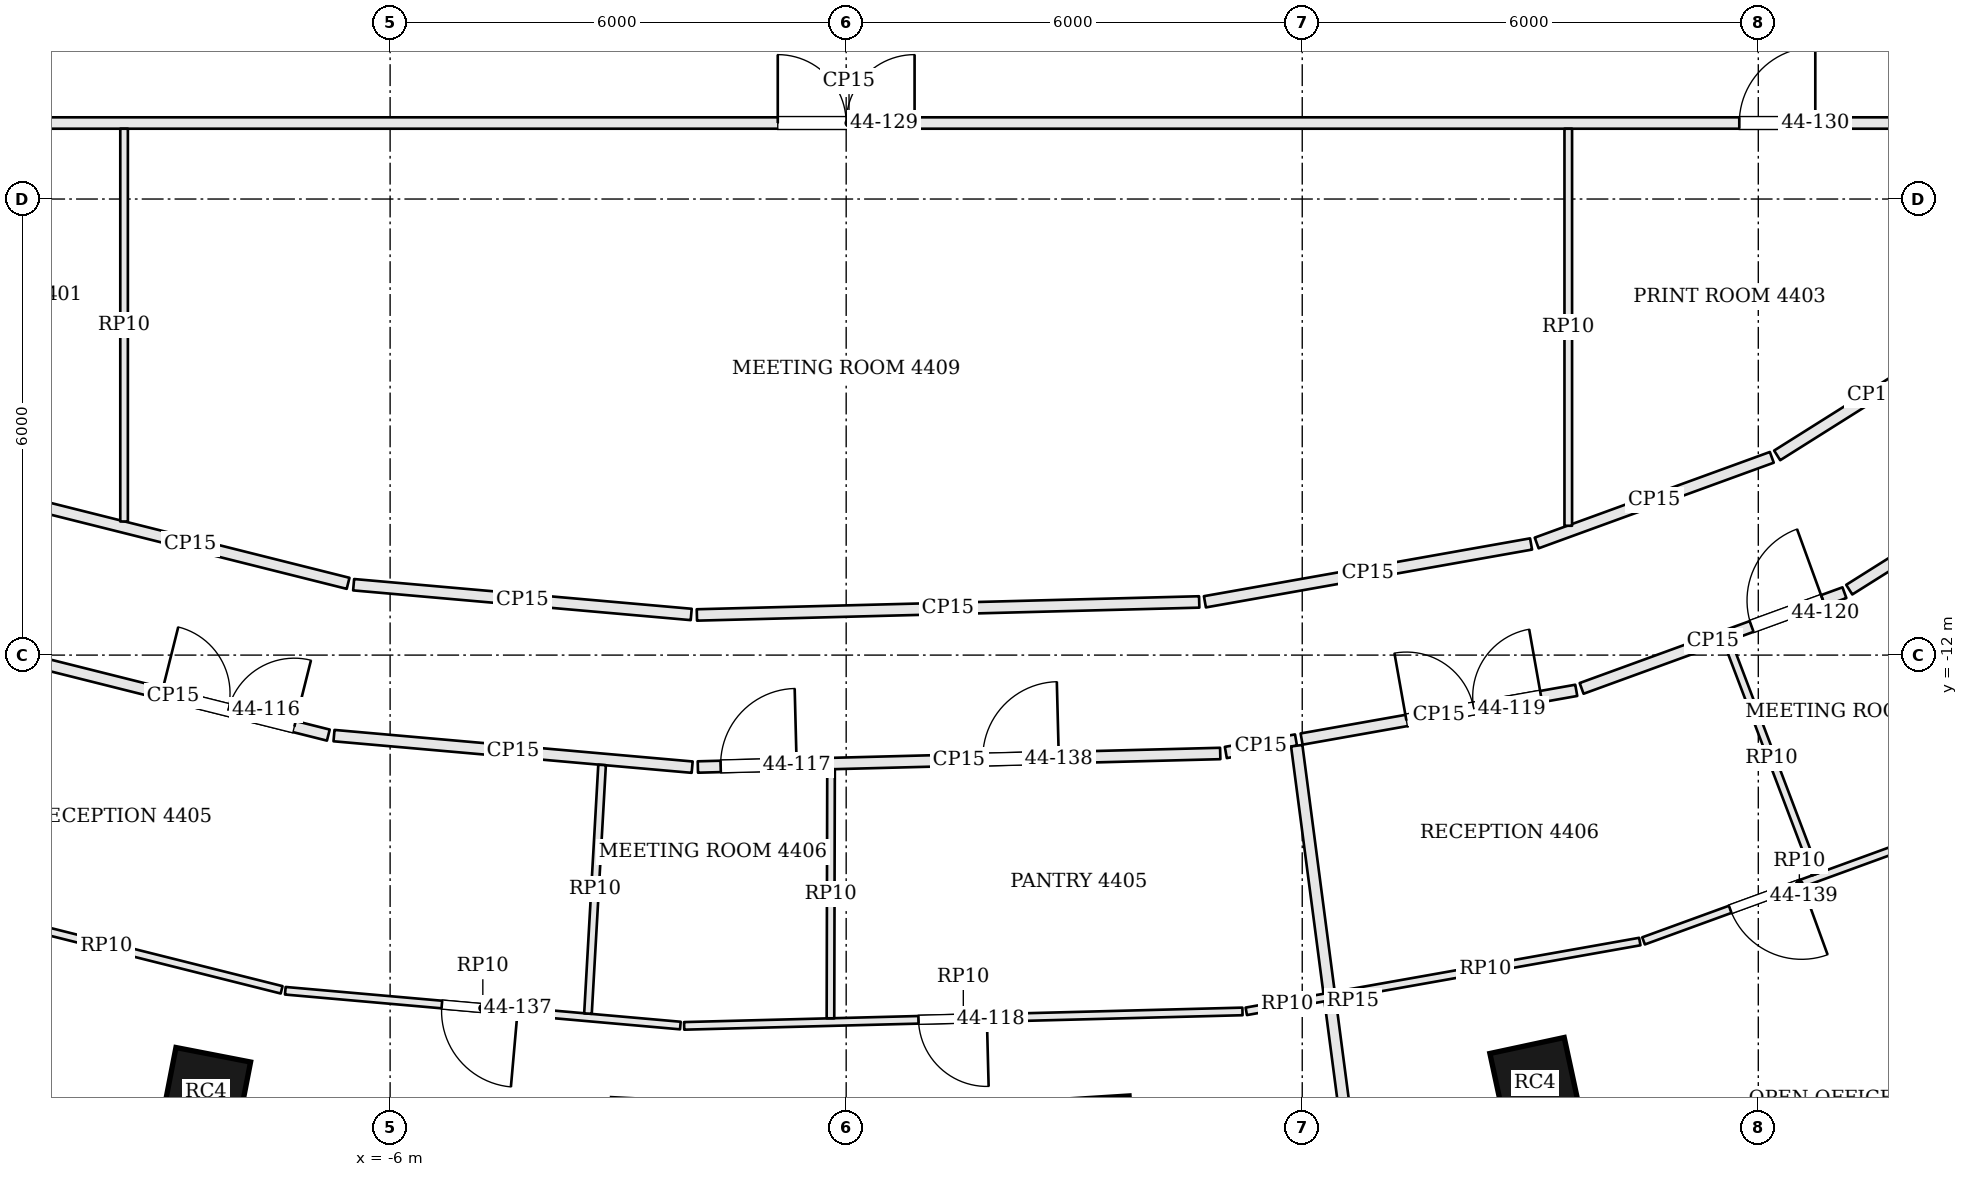
"""IFC4 building model, lengths in metres.
Left out: names, types, materials, properties, quantities, classifications, styles, units other than length and angle.
Written with IfcOpenShell. Run it as: python <this file> out.ifc"""

import sys

from ifc_helpers import new_model, si_unit, direction, frame, frame_2d, origin, origin_2d, place, context, subcontext, project, spatial, rectangle, extrude, element, fill, save


model = new_model("IFC4")
c1 = context("Model", 3, precision=1e-05, world=origin(), true_north=direction((0.0, 1.0)))
c2 = subcontext(c1, "Body", "Model", "MODEL_VIEW")
j1 = project(units=[si_unit("LENGTHUNIT", "METRE"), si_unit("PLANEANGLEUNIT", "RADIAN")], contexts=[c1])
p1 = place(None, origin())
s1 = spatial("IfcSite", under=j1, at=p1, CompositionType="ELEMENT")
p2 = place(p1, origin())
s2 = spatial("IfcBuilding", under=s1, at=p2, CompositionType="ELEMENT")
p3 = place(p2, frame((0.0, 0.0, 181.8)))
s3 = spatial("IfcBuildingStorey", under=s2, at=p3, CompositionType="ELEMENT", Elevation=181.8)
for number, where, z_axis, x_axis in (
    (1, (-8.422, -17.749, 0.0), (0.0, 0.0, 1.0), (0.982, -0.191, 0.0)),
    (2, (3.254, -18.33, 0.0), (0.0, 0.0, 1.0), (0.998, 0.063, 0.0)),
    (3, (9.063, -17.625, 0.0), (0.0, 0.0, 1.0), (0.978, 0.21, 0.0)),
):
    element("IfcColumn", number, at=place(p3, frame(where, z_axis=z_axis, x_axis=x_axis)), inside=s3, PredefinedType="COLUMN", context=c2, shape_type="SweptSolid", body=[
        extrude(rectangle(XDim=1.0, YDim=1.0, at=origin_2d()), origin(), (0.0, 0.0, 1.0), 3.9),
    ])
p4 = place(p3, frame((-10.897, -12.029, 0.0), z_axis=(0.0, 0.0, 1.0), x_axis=(0.969999087169, -0.24310855783, 0.0)))
e4 = element("IfcWall", 4, at=p4, inside=s3, PredefinedType="PARTITIONING", context=c2, shape_type="SweptSolid", body=[
    extrude(rectangle(XDim=4.211, YDim=0.15, at=frame_2d((2.105, 0.0))), origin(), (0.0, 0.0, 1.0), 3.084),
])
p5 = place(p4, frame((1.95, 0.0, 0.0)))
e5 = element("IfcOpeningElement", 5, at=p5, cuts=e4, PredefinedType="OPENING", context=c2, shape_type="SweptSolid", body=[
    extrude(rectangle(XDim=1.8, YDim=2.1, at=frame_2d((0.9, 1.05))), frame((0.0, 0.085, 0.0), z_axis=(0.0, -1.0, 0.0), x_axis=(1.0, 0.0, 0.0)), (0.0, 0.0, 1.0), 0.17),
])
p6 = place(p3, frame((-6.738, -13.059, 0.0), z_axis=(0.0, 0.0, 1.0), x_axis=(0.996143527037, -0.087738666181, 0.0)))
e6 = element("IfcWall", 6, at=p6, inside=s3, PredefinedType="PARTITIONING", context=c2, shape_type="SweptSolid", body=[
    extrude(rectangle(XDim=4.73, YDim=0.15, at=frame_2d((2.365, 0.0))), origin(), (0.0, 0.0, 1.0), 3.084),
])
p7 = place(p3, frame((-1.951, -13.472, 0.0), z_axis=(0.0, 0.0, 1.0), x_axis=(0.999663898238, 0.025924709429, 0.0)))
e7 = element("IfcWall", 7, at=p7, inside=s3, PredefinedType="PARTITIONING", context=c2, shape_type="SweptSolid", body=[
    extrude(rectangle(XDim=6.875, YDim=0.15, at=frame_2d((3.437, 0.0))), origin(), (0.0, 0.0, 1.0), 3.084),
])
p8 = place(p7, frame((0.3, 0.0, 0.0)))
e8 = element("IfcOpeningElement", 8, at=p8, cuts=e7, PredefinedType="OPENING", context=c2, shape_type="SweptSolid", body=[
    extrude(rectangle(XDim=1.0, YDim=2.4, at=frame_2d((0.5, 1.2))), frame((0.0, 0.085, 0.0), z_axis=(0.0, -1.0, 0.0), x_axis=(1.0, 0.0, 0.0)), (0.0, 0.0, 1.0), 0.17),
])
p9 = place(p7, frame((3.75, 0.0, 0.0)))
e9 = element("IfcOpeningElement", 9, at=p9, cuts=e7, PredefinedType="OPENING", context=c2, shape_type="SweptSolid", body=[
    extrude(rectangle(XDim=1.0, YDim=2.1, at=frame_2d((0.5, 1.05))), frame((0.0, 0.085, 0.0), z_axis=(0.0, -1.0, 0.0), x_axis=(1.0, 0.0, 0.0)), (0.0, 0.0, 1.0), 0.17),
])
p10 = place(p3, frame((4.995, -13.281, 0.0), z_axis=(0.0, 0.0, 1.0), x_axis=(0.984615318048, 0.174736016506, 0.0)))
e10 = element("IfcWall", 10, at=p10, inside=s3, PredefinedType="PARTITIONING", context=c2, shape_type="SweptSolid", body=[
    extrude(rectangle(XDim=0.938, YDim=0.15, at=frame_2d((0.469, 0.0))), origin(), (0.0, 0.0, 1.0), 3.084),
])
p11 = place(p3, frame((6.807, -19.901, 0.0), z_axis=(0.0, 0.0, 1.0), x_axis=(-0.129934596003, 0.991522566945, 0.0)))
e11 = element("IfcWall", 11, at=p11, inside=s3, PredefinedType="PARTITIONING", context=c2, shape_type="SweptSolid", body=[
    extrude(rectangle(XDim=6.766, YDim=0.15, at=frame_2d((3.383, 0.0))), origin(), (0.0, 0.0, 1.0), 3.234),
])
p12 = place(p3, frame((5.992, -13.104, 0.0), z_axis=(0.0, 0.0, 1.0), x_axis=(0.98463249319, 0.174639209096, 0.0)))
e12 = element("IfcWall", 12, at=p12, inside=s3, PredefinedType="PARTITIONING", context=c2, shape_type="SweptSolid", body=[
    extrude(rectangle(XDim=3.67, YDim=0.15, at=frame_2d((1.835, 0.0))), origin(), (0.0, 0.0, 1.0), 3.084),
])
p13 = place(p12, frame((1.4, 0.0, 0.0)))
e13 = element("IfcOpeningElement", 13, at=p13, cuts=e12, PredefinedType="OPENING", context=c2, shape_type="SweptSolid", body=[
    extrude(rectangle(XDim=1.8, YDim=2.1, at=frame_2d((0.9, 1.05))), frame((0.0, 0.085, 0.0), z_axis=(0.0, -1.0, 0.0), x_axis=(1.0, 0.0, 0.0)), (0.0, 0.0, 1.0), 0.17),
])
p14 = place(p3, frame((9.676, -12.438, 0.0), z_axis=(0.0, 0.0, 1.0), x_axis=(0.939640289748, 0.342163887461, 0.0)))
e14 = element("IfcWall", 14, at=p14, inside=s3, PredefinedType="PARTITIONING", context=c2, shape_type="SweptSolid", body=[
    extrude(rectangle(XDim=3.68, YDim=0.15, at=frame_2d((1.84, 0.0))), origin(), (0.0, 0.0, 1.0), 3.084),
])
p15 = place(p14, frame((2.38, 0.0, 0.0)))
e15 = element("IfcOpeningElement", 15, at=p15, cuts=e14, PredefinedType="OPENING", context=c2, shape_type="SweptSolid", body=[
    extrude(rectangle(XDim=1.0, YDim=2.4, at=frame_2d((0.5, 1.2))), frame((0.0, 0.085, 0.0), z_axis=(0.0, -1.0, 0.0), x_axis=(1.0, 0.0, 0.0)), (0.0, 0.0, 1.0), 0.17),
])
p16 = place(p3, frame((13.197, -11.139, 0.0), z_axis=(0.0, 0.0, 1.0), x_axis=(0.846390903833, 0.532562144644, 0.0)))
e16 = element("IfcWall", 16, at=p16, inside=s3, PredefinedType="PARTITIONING", context=c2, shape_type="SweptSolid", body=[
    extrude(rectangle(XDim=3.481, YDim=0.15, at=frame_2d((1.741, 0.0))), origin(), (0.0, 0.0, 1.0), 3.084),
])
p17 = place(p16, frame((1.45, 0.0, 0.0)))
e17 = element("IfcOpeningElement", 17, at=p17, cuts=e16, PredefinedType="OPENING", context=c2, shape_type="SweptSolid", body=[
    extrude(rectangle(XDim=1.0, YDim=2.1, at=frame_2d((0.5, 1.05))), frame((0.0, 0.085, 0.0), z_axis=(0.0, -1.0, 0.0), x_axis=(1.0, 0.0, 0.0)), (0.0, 0.0, 1.0), 0.17),
])
p18 = place(p3, frame((14.777, -7.781, 0.0), z_axis=(0.0, 0.0, 1.0), x_axis=(-0.846359741043, -0.532611667862, 0.0)))
e18 = element("IfcWall", 18, at=p18, inside=s3, PredefinedType="PARTITIONING", context=c2, shape_type="SweptSolid", body=[
    extrude(rectangle(XDim=2.987, YDim=0.15, at=frame_2d((1.494, 0.0))), origin(), (0.0, 0.0, 1.0), 3.084),
])
p19 = place(p3, frame((12.178, -9.398, 0.0), z_axis=(0.0, 0.0, 1.0), x_axis=(-0.939609240084, -0.342249143093, 0.0)))
e19 = element("IfcWall", 19, at=p19, inside=s3, PredefinedType="PARTITIONING", context=c2, shape_type="SweptSolid", body=[
    extrude(rectangle(XDim=3.292, YDim=0.15, at=frame_2d((1.646, 0.0))), origin(), (0.0, 0.0, 1.0), 3.084),
])
p20 = place(p3, frame((9.01, -10.538, 0.0), z_axis=(0.0, 0.0, 1.0), x_axis=(-0.984645638575, -0.174565077936, 0.0)))
e20 = element("IfcWall", 20, at=p20, inside=s3, PredefinedType="PARTITIONING", context=c2, shape_type="SweptSolid", body=[
    extrude(rectangle(XDim=4.358, YDim=0.15, at=frame_2d((2.179, 0.0))), origin(), (0.0, 0.0, 1.0), 3.084),
])
p21 = place(p3, frame((4.645, -11.301, 0.0), z_axis=(0.0, 0.0, 1.0), x_axis=(-0.9996648469, -0.02588810291, 0.0)))
e21 = element("IfcWall", 21, at=p21, inside=s3, PredefinedType="PARTITIONING", context=c2, shape_type="SweptSolid", body=[
    extrude(rectangle(XDim=6.611, YDim=0.15, at=frame_2d((3.305, 0.0))), origin(), (0.0, 0.0, 1.0), 3.084),
])
p22 = place(p3, frame((-2.039, -11.465, 0.0), z_axis=(0.0, 0.0, 1.0), x_axis=(-0.996139855484, 0.087780341286, 0.0)))
e22 = element("IfcWall", 22, at=p22, inside=s3, PredefinedType="PARTITIONING", context=c2, shape_type="SweptSolid", body=[
    extrude(rectangle(XDim=4.458, YDim=0.15, at=frame_2d((2.229, 0.0))), origin(), (0.0, 0.0, 1.0), 3.084),
])
p23 = place(p3, frame((-6.553, -11.056, 0.0), z_axis=(0.0, 0.0, 1.0), x_axis=(-0.970004917182, 0.243085294995, 0.0)))
e23 = element("IfcWall", 23, at=p23, inside=s3, PredefinedType="PARTITIONING", context=c2, shape_type="SweptSolid", body=[
    extrude(rectangle(XDim=4.284, YDim=0.15, at=frame_2d((2.142, 0.0))), origin(), (0.0, 0.0, 1.0), 3.084),
])
p24 = place(p3, frame((-14.925, -5.0, 0.0), z_axis=(0.0, 0.0, 1.0), x_axis=(1.0, 0.0, 0.0)))
e24 = element("IfcWall", 24, at=p24, inside=s3, PredefinedType="PARTITIONING", context=c2, shape_type="SweptSolid", body=[
    extrude(rectangle(XDim=29.925, YDim=0.15, at=frame_2d((14.962, 0.0))), origin(), (0.0, 0.0, 1.0), 3.084),
])
p25 = place(p24, frame((2.175, 0.0, 0.0)))
e25 = element("IfcOpeningElement", 25, at=p25, cuts=e24, PredefinedType="OPENING", context=c2, shape_type="SweptSolid", body=[
    extrude(rectangle(XDim=1.0, YDim=2.1, at=frame_2d((0.5, 1.05))), frame((0.0, 0.085, 0.0), z_axis=(0.0, -1.0, 0.0), x_axis=(1.0, 0.0, 0.0)), (0.0, 0.0, 1.0), 0.17),
])
p26 = place(p24, frame((14.025, 0.0, 0.0)))
e26 = element("IfcOpeningElement", 26, at=p26, cuts=e24, PredefinedType="OPENING", context=c2, shape_type="SweptSolid", body=[
    extrude(rectangle(XDim=1.8, YDim=2.1, at=frame_2d((0.9, 1.05))), frame((0.0, 0.085, 0.0), z_axis=(0.0, -1.0, 0.0), x_axis=(1.0, 0.0, 0.0)), (0.0, 0.0, 1.0), 0.17),
])
p27 = place(p24, frame((26.675, 0.0, 0.0)))
e27 = element("IfcOpeningElement", 27, at=p27, cuts=e24, PredefinedType="OPENING", context=c2, shape_type="SweptSolid", body=[
    extrude(rectangle(XDim=1.0, YDim=2.1, at=frame_2d((0.5, 1.05))), frame((0.0, 0.085, 0.0), z_axis=(0.0, -1.0, 0.0), x_axis=(1.0, 0.0, 0.0)), (0.0, 0.0, 1.0), 0.17),
])
p28 = place(p3, frame((6.34, -16.496, 0.0), z_axis=(0.0, 0.0, 1.0), x_axis=(-0.984632558058, -0.174638843366, 0.0)))
e28 = element("IfcWall", 28, at=p28, inside=s3, PredefinedType="PARTITIONING", context=c2, shape_type="SweptSolid", body=[
    extrude(rectangle(XDim=1.093, YDim=0.1, at=frame_2d((0.547, 0.0))), origin(), (0.0, 0.0, 1.0), 3.084),
])
p29 = place(p3, frame((5.214, -16.688, 0.0), z_axis=(0.0, 0.0, 1.0), x_axis=(-0.999664981446, -0.025882906921, 0.0)))
e29 = element("IfcWall", 29, at=p29, inside=s3, PredefinedType="PARTITIONING", context=c2, shape_type="SweptSolid", body=[
    extrude(rectangle(XDim=7.348, YDim=0.1, at=frame_2d((3.674, 0.0))), origin(), (0.0, 0.0, 1.0), 3.084),
])
p30 = place(p29, frame((3.364, 0.0, 0.0)))
e30 = element("IfcOpeningElement", 30, at=p30, cuts=e29, PredefinedType="OPENING", context=c2, shape_type="SweptSolid", body=[
    extrude(rectangle(XDim=0.9, YDim=2.1, at=frame_2d((0.45, 1.05))), frame((0.0, 0.06, 0.0), z_axis=(0.0, -1.0, 0.0), x_axis=(1.0, 0.0, 0.0)), (0.0, 0.0, 1.0), 0.12),
])
p31 = place(p3, frame((-2.181, -16.874, 0.0), z_axis=(0.0, 0.0, 1.0), x_axis=(-0.996143934904, 0.087734035321, 0.0)))
e31 = element("IfcWall", 31, at=p31, inside=s3, PredefinedType="PARTITIONING", context=c2, shape_type="SweptSolid", body=[
    extrude(rectangle(XDim=5.218, YDim=0.1, at=frame_2d((2.609, 0.0))), origin(), (0.0, 0.0, 1.0), 3.084),
])
p32 = place(p31, frame((2.15, 0.0, 0.0)))
e32 = element("IfcOpeningElement", 32, at=p32, cuts=e31, PredefinedType="OPENING", context=c2, shape_type="SweptSolid", body=[
    extrude(rectangle(XDim=1.0, YDim=2.1, at=frame_2d((0.5, 1.05))), frame((0.0, 0.06, 0.0), z_axis=(0.0, -1.0, 0.0), x_axis=(1.0, 0.0, 0.0)), (0.0, 0.0, 1.0), 0.12),
])
p33 = place(p3, frame((-7.427, -16.404, 0.0), z_axis=(0.0, 0.0, 1.0), x_axis=(-0.970009433409, 0.243067272783, 0.0)))
e33 = element("IfcWall", 33, at=p33, inside=s3, PredefinedType="PARTITIONING", context=c2, shape_type="SweptSolid", body=[
    extrude(rectangle(XDim=4.754, YDim=0.1, at=frame_2d((2.377, 0.0))), origin(), (0.0, 0.0, 1.0), 3.084),
])
p34 = place(p3, frame((-3.211, -13.445, 0.0), z_axis=(0.0, 0.0, 1.0), x_axis=(-0.056703901856, -0.99839103938, 0.0)))
e34 = element("IfcWall", 34, at=p34, inside=s3, PredefinedType="PARTITIONING", context=c2, shape_type="SweptSolid", body=[
    extrude(rectangle(XDim=3.277, YDim=0.1, at=frame_2d((1.638, 0.0))), origin(), (0.0, 0.0, 1.0), 3.084),
])
p35 = place(p3, frame((-0.199, -13.502, 0.0), z_axis=(0.0, 0.0, 1.0), x_axis=(-0.002309978934, -0.999997331995, 0.0)))
e35 = element("IfcWall", 35, at=p35, inside=s3, PredefinedType="PARTITIONING", context=c2, shape_type="SweptSolid", body=[
    extrude(rectangle(XDim=3.276, YDim=0.1, at=frame_2d((1.638, 0.0))), origin(), (0.0, 0.0, 1.0), 3.084),
])
p36 = place(p3, frame((14.59, -14.267, 0.0), z_axis=(0.0, 0.0, 1.0), x_axis=(-0.939623405418, -0.342210251148, 0.0)))
e36 = element("IfcWall", 36, at=p36, inside=s3, PredefinedType="PARTITIONING", context=c2, shape_type="SweptSolid", body=[
    extrude(rectangle(XDim=4.363, YDim=0.1, at=frame_2d((2.182, 0.0))), origin(), (0.0, 0.0, 1.0), 3.084),
])
p37 = place(p36, frame((2.15, 0.0, 0.0)))
e37 = element("IfcOpeningElement", 37, at=p37, cuts=e36, PredefinedType="OPENING", context=c2, shape_type="SweptSolid", body=[
    extrude(rectangle(XDim=1.0, YDim=2.1, at=frame_2d((0.5, 1.05))), frame((0.0, 0.06, 0.0), z_axis=(0.0, -1.0, 0.0), x_axis=(1.0, 0.0, 0.0)), (0.0, 0.0, 1.0), 0.12),
])
p38 = place(p3, frame((10.441, -15.769, 0.0), z_axis=(0.0, 0.0, 1.0), x_axis=(-0.984637220861, -0.174612551941, 0.0)))
e38 = element("IfcWall", 38, at=p38, inside=s3, PredefinedType="PARTITIONING", context=c2, shape_type="SweptSolid", body=[
    extrude(rectangle(XDim=4.125, YDim=0.1, at=frame_2d((2.062, 0.0))), origin(), (0.0, 0.0, 1.0), 3.084),
])
p39 = place(p3, frame((11.594, -11.819, 0.0), z_axis=(0.0, 0.0, 1.0), x_axis=(0.354584575087, -0.935023945742, 0.0)))
e39 = element("IfcWall", 39, at=p39, inside=s3, PredefinedType="PARTITIONING", context=c2, shape_type="SweptSolid", body=[
    extrude(rectangle(XDim=3.275, YDim=0.1, at=frame_2d((1.638, 0.0))), origin(), (0.0, 0.0, 1.0), 3.084),
])
p40 = place(p3, frame((-9.5, -10.242, 0.0), z_axis=(0.0, 0.0, 1.0), x_axis=(0.0, 1.0, 0.0)))
e40 = element("IfcWall", 40, at=p40, inside=s3, PredefinedType="PARTITIONING", context=c2, shape_type="SweptSolid", body=[
    extrude(rectangle(XDim=5.167, YDim=0.1, at=frame_2d((2.583, 0.0))), origin(), (0.0, 0.0, 1.0), 3.084),
])
p41 = place(p3, frame((9.5, -10.299, 0.0), z_axis=(0.0, 0.0, 1.0), x_axis=(0.0, 1.0, 0.0)))
e41 = element("IfcWall", 41, at=p41, inside=s3, PredefinedType="PARTITIONING", context=c2, shape_type="SweptSolid", body=[
    extrude(rectangle(XDim=5.224, YDim=0.1, at=frame_2d((2.612, 0.0))), origin(), (0.0, 0.0, 1.0), 3.084),
])
p42 = place(p5, origin())
e42 = element("IfcDoor", 42, at=p42, inside=s3, OperationType="DOUBLE_DOOR_SINGLE_SWING", PredefinedType="DOOR", context=c2, shape_type="SweptSolid", body=[
    extrude(rectangle(XDim=1.8, YDim=2.1, at=frame_2d((0.9, 1.05))), frame((0.0, 0.025, 0.0), z_axis=(0.0, -1.0, 0.0), x_axis=(1.0, 0.0, 0.0)), (0.0, 0.0, 1.0), 0.05),
])
fill(e5, e42)
p43 = place(p8, origin())
e43 = element("IfcDoor", 43, at=p43, inside=s3, OperationType="SINGLE_SWING_RIGHT", PredefinedType="DOOR", context=c2, shape_type="SweptSolid", body=[
    extrude(rectangle(XDim=1.0, YDim=2.4, at=frame_2d((0.5, 1.2))), frame((0.0, 0.025, 0.0), z_axis=(0.0, -1.0, 0.0), x_axis=(1.0, 0.0, 0.0)), (0.0, 0.0, 1.0), 0.05),
])
fill(e8, e43)
p44 = place(p30, origin())
e44 = element("IfcDoor", 44, at=p44, inside=s3, OperationType="SINGLE_SWING_LEFT", PredefinedType="DOOR", context=c2, shape_type="SweptSolid", body=[
    extrude(rectangle(XDim=0.9, YDim=2.1, at=frame_2d((0.45, 1.05))), frame((0.0, 0.025, 0.0), z_axis=(0.0, -1.0, 0.0), x_axis=(1.0, 0.0, 0.0)), (0.0, 0.0, 1.0), 0.05),
])
fill(e30, e44)
p45 = place(p13, origin())
e45 = element("IfcDoor", 45, at=p45, inside=s3, OperationType="DOUBLE_DOOR_SINGLE_SWING", PredefinedType="DOOR", context=c2, shape_type="SweptSolid", body=[
    extrude(rectangle(XDim=1.8, YDim=2.1, at=frame_2d((0.9, 1.05))), frame((0.0, 0.025, 0.0), z_axis=(0.0, -1.0, 0.0), x_axis=(1.0, 0.0, 0.0)), (0.0, 0.0, 1.0), 0.05),
])
fill(e13, e45)
p46 = place(p15, origin())
e46 = element("IfcDoor", 46, at=p46, inside=s3, OperationType="SINGLE_SWING_RIGHT", PredefinedType="DOOR", context=c2, shape_type="SweptSolid", body=[
    extrude(rectangle(XDim=1.0, YDim=2.4, at=frame_2d((0.5, 1.2))), frame((0.0, 0.025, 0.0), z_axis=(0.0, -1.0, 0.0), x_axis=(1.0, 0.0, 0.0)), (0.0, 0.0, 1.0), 0.05),
])
fill(e15, e46)
p47 = place(p26, origin())
e47 = element("IfcDoor", 47, at=p47, inside=s3, OperationType="DOUBLE_DOOR_SINGLE_SWING", PredefinedType="DOOR", context=c2, shape_type="SweptSolid", body=[
    extrude(rectangle(XDim=1.8, YDim=2.1, at=frame_2d((0.9, 1.05))), frame((0.0, 0.025, 0.0), z_axis=(0.0, -1.0, 0.0), x_axis=(1.0, 0.0, 0.0)), (0.0, 0.0, 1.0), 0.05),
])
fill(e26, e47)
p48 = place(p27, origin())
e48 = element("IfcDoor", 48, at=p48, inside=s3, OperationType="SINGLE_SWING_RIGHT", PredefinedType="DOOR", context=c2, shape_type="SweptSolid", body=[
    extrude(rectangle(XDim=1.0, YDim=2.1, at=frame_2d((0.5, 1.05))), frame((0.0, 0.025, 0.0), z_axis=(0.0, -1.0, 0.0), x_axis=(1.0, 0.0, 0.0)), (0.0, 0.0, 1.0), 0.05),
])
fill(e27, e48)
p49 = place(p32, origin())
e49 = element("IfcDoor", 49, at=p49, inside=s3, OperationType="SINGLE_SWING_LEFT", PredefinedType="DOOR", context=c2, shape_type="SweptSolid", body=[
    extrude(rectangle(XDim=1.0, YDim=2.1, at=frame_2d((0.5, 1.05))), frame((0.0, 0.025, 0.0), z_axis=(0.0, -1.0, 0.0), x_axis=(1.0, 0.0, 0.0)), (0.0, 0.0, 1.0), 0.05),
])
fill(e32, e49)
p50 = place(p9, origin())
e50 = element("IfcDoor", 50, at=p50, inside=s3, OperationType="SINGLE_SWING_RIGHT", PredefinedType="DOOR", context=c2, shape_type="SweptSolid", body=[
    extrude(rectangle(XDim=1.0, YDim=2.1, at=frame_2d((0.5, 1.05))), frame((0.0, 0.025, 0.0), z_axis=(0.0, -1.0, 0.0), x_axis=(1.0, 0.0, 0.0)), (0.0, 0.0, 1.0), 0.05),
])
fill(e9, e50)
p51 = place(p37, origin())
e51 = element("IfcDoor", 51, at=p51, inside=s3, OperationType="SINGLE_SWING_LEFT", PredefinedType="DOOR", context=c2, shape_type="SweptSolid", body=[
    extrude(rectangle(XDim=1.0, YDim=2.1, at=frame_2d((0.5, 1.05))), frame((0.0, 0.025, 0.0), z_axis=(0.0, -1.0, 0.0), x_axis=(1.0, 0.0, 0.0)), (0.0, 0.0, 1.0), 0.05),
])
fill(e37, e51)
save(model, sys.argv[1])
